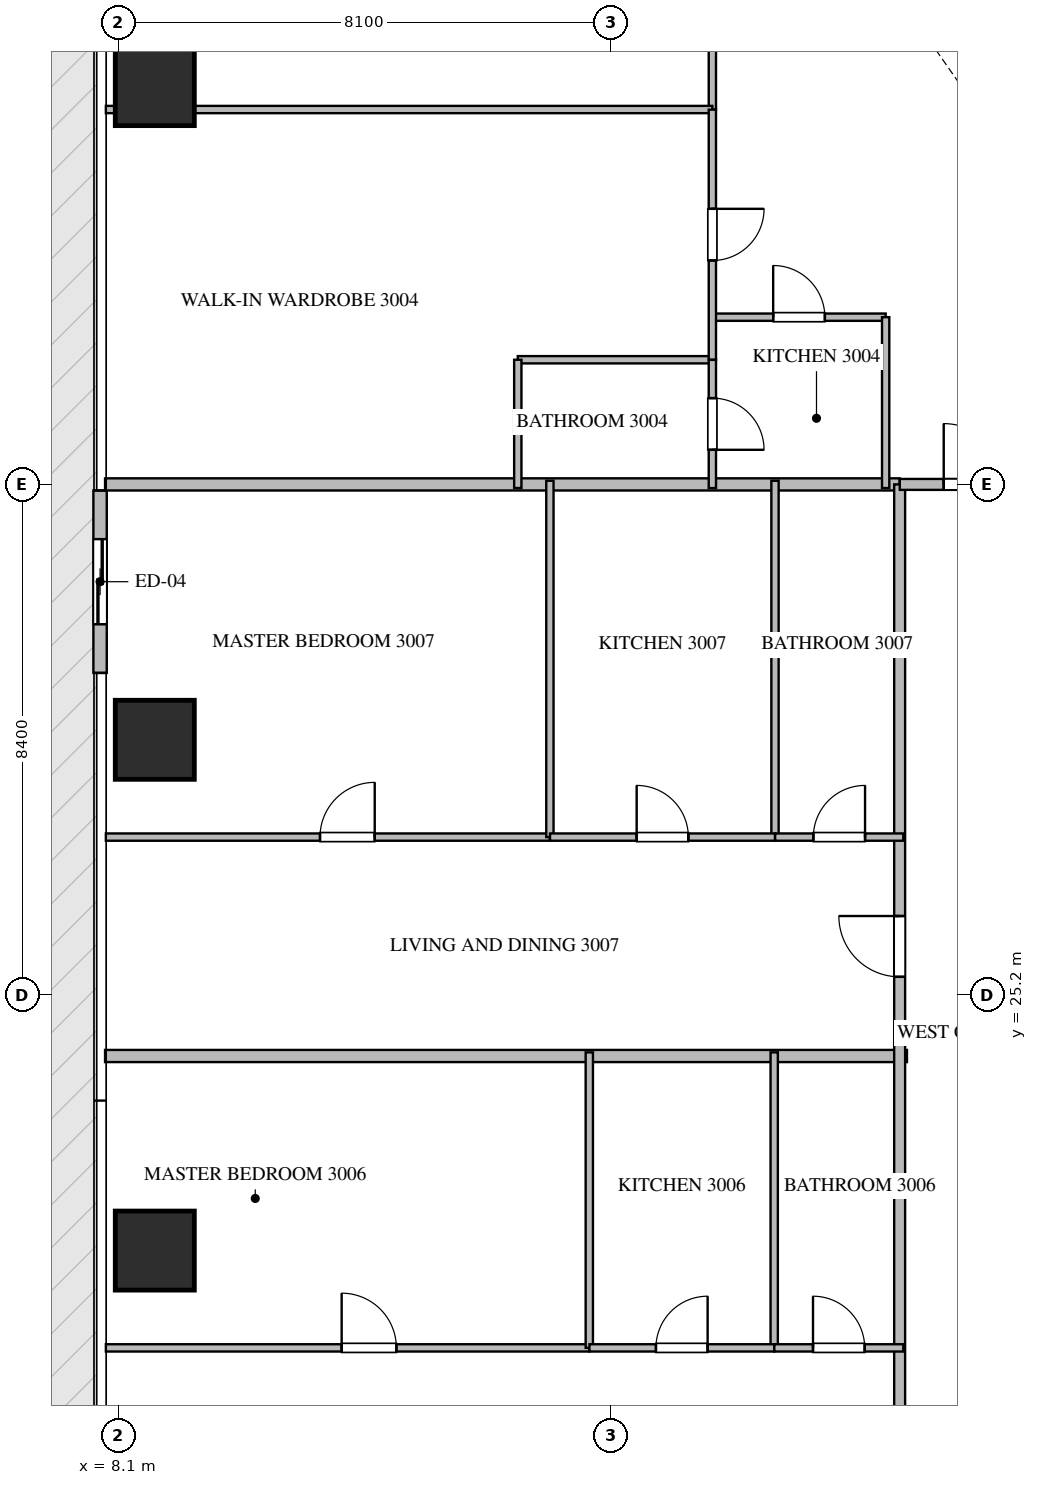
"""IFC4 building model, lengths in metres.
Left out: names, types, materials, properties, quantities, classifications, styles, units other than length and angle.
Written with IfcOpenShell. Run it as: python <this file> out.ifc"""

import sys

from ifc_helpers import new_model, si_unit, direction, frame, frame_2d, origin, origin_2d, place, context, subcontext, project, spatial, rectangle, extrude, source, transform, mapped, element, fill, save


model = new_model("IFC4")
c1 = context("Model", 3, precision=1e-05, world=origin(), true_north=direction((0.0, 1.0)))
c2 = subcontext(c1, "Body", "Model", "MODEL_VIEW")
j1 = project(units=[si_unit("LENGTHUNIT", "METRE"), si_unit("PLANEANGLEUNIT", "RADIAN")], contexts=[c1])
p1 = place(None, origin())
s1 = spatial("IfcSite", under=j1, at=p1, CompositionType="ELEMENT")
p2 = place(p1, origin())
s2 = spatial("IfcBuilding", under=s1, at=p2, CompositionType="ELEMENT")
p3 = place(p2, frame((0.0, 0.0, 123.9)))
s3 = spatial("IfcBuildingStorey", under=s2, at=p3, CompositionType="ELEMENT", Elevation=123.9)
m1 = source(origin(), c2, "Body", "SweptSolid", [
    extrude(rectangle(XDim=1.3, YDim=1.3, at=origin_2d()), origin(), (0.0, 0.0, 1.0), 3.75),
])
for number, where, z_axis, x_axis in (
    (1, (8.7, 21.0, -0.26), (0.0, 0.0, 1.0), (1.0, 0.0, 0.0)),
    (2, (8.7, 29.4, -0.26), (0.0, 0.0, 1.0), (1.0, 0.0, 0.0)),
    (3, (8.7, 40.15, -0.26), (0.0, 0.0, 1.0), (1.0, 0.0, 0.0)),
):
    element("IfcColumn", number, at=place(p3, frame(where, z_axis=z_axis, x_axis=x_axis)), inside=s3, PredefinedType="COLUMN", context=c2, shape_type="MappedRepresentation", body=[
        mapped(m1, transform((0.0, 0.0, 0.0), scale=1.0)),
    ])
p4 = place(p3, frame((7.8, 33.5, 0.0), z_axis=(0.0, 0.0, 1.0), x_axis=(0.0, -1.0, 0.0)))
e4 = element("IfcWall", 4, at=p4, inside=s3, PredefinedType="ELEMENTEDWALL", context=c2, shape_type="SweptSolid", body=[
    extrude(rectangle(XDim=3.0, YDim=0.22, at=frame_2d((1.5, 0.0))), origin(), (0.0, 0.0, 1.0), 3.475),
])
p5 = place(p4, frame((0.8, 0.0, 0.0)))
e5 = element("IfcOpeningElement", 5, at=p5, cuts=e4, PredefinedType="OPENING", context=c2, shape_type="SweptSolid", body=[
    extrude(rectangle(XDim=1.4, YDim=2.25, at=frame_2d((0.7, 1.125))), frame((0.0, 0.12, 0.0), z_axis=(0.0, -1.0, 0.0), x_axis=(1.0, 0.0, 0.0)), (0.0, 0.0, 1.0), 0.24),
])
p6 = place(p3, frame((7.882, 24.2, 0.0), z_axis=(0.0, 0.0, 1.0), x_axis=(1.0, 0.0, 0.0)))
e6 = element("IfcWall", 6, at=p6, inside=s3, PredefinedType="PARTITIONING", context=c2, shape_type="SweptSolid", body=[
    extrude(rectangle(XDim=13.188, YDim=0.2, at=frame_2d((6.594, 0.0))), origin(), (0.0, 0.0, 1.0), 3.49),
])
p7 = place(p3, frame((7.882, 33.6, 0.0), z_axis=(0.0, 0.0, 1.0), x_axis=(1.0, 0.0, 0.0)))
e7 = element("IfcWall", 7, at=p7, inside=s3, PredefinedType="PARTITIONING", context=c2, shape_type="SweptSolid", body=[
    extrude(rectangle(XDim=13.068, YDim=0.2, at=frame_2d((6.534, 0.0))), origin(), (0.0, 0.0, 1.0), 3.49),
])
p8 = place(p3, frame((20.95, 14.9, 0.0), z_axis=(0.0, 0.0, 1.0), x_axis=(0.0, 1.0, 0.0)))
e8 = element("IfcWall", 8, at=p8, inside=s3, PredefinedType="PARTITIONING", context=c2, shape_type="SweptSolid", body=[
    extrude(rectangle(XDim=18.7, YDim=0.18, at=frame_2d((9.35, 0.0))), origin(), (0.0, 0.0, 1.0), 3.49),
])
p9 = place(p8, frame((1.805, 0.0, 0.0)))
e9 = element("IfcOpeningElement", 9, at=p9, cuts=e8, PredefinedType="OPENING", context=c2, shape_type="SweptSolid", body=[
    extrude(rectangle(XDim=1.0, YDim=2.15, at=frame_2d((0.5, 1.075))), frame((0.0, 0.1, 0.0), z_axis=(0.0, -1.0, 0.0), x_axis=(1.0, 0.0, 0.0)), (0.0, 0.0, 1.0), 0.2),
])
p10 = place(p8, frame((10.602, 0.0, 0.0)))
e10 = element("IfcOpeningElement", 10, at=p10, cuts=e8, PredefinedType="OPENING", context=c2, shape_type="SweptSolid", body=[
    extrude(rectangle(XDim=1.0, YDim=2.15, at=frame_2d((0.5, 1.075))), frame((0.0, 0.1, 0.0), z_axis=(0.0, -1.0, 0.0), x_axis=(1.0, 0.0, 0.0)), (0.0, 0.0, 1.0), 0.2),
])
p11 = place(p3, frame((20.952, 33.6, 0.0), z_axis=(0.0, 0.0, 1.0), x_axis=(1.0, 0.0, 0.0)))
e11 = element("IfcWall", 11, at=p11, inside=s3, PredefinedType="PARTITIONING", context=c2, shape_type="SweptSolid", body=[
    extrude(rectangle(XDim=2.446, YDim=0.18, at=frame_2d((1.223, 0.0))), origin(), (0.0, 0.0, 1.0), 3.49),
])
p12 = place(p11, frame((0.723, 0.0, 0.0)))
e12 = element("IfcOpeningElement", 12, at=p12, cuts=e11, PredefinedType="OPENING", context=c2, shape_type="SweptSolid", body=[
    extrude(rectangle(XDim=1.0, YDim=2.15, at=frame_2d((0.5, 1.075))), frame((0.0, 0.1, 0.0), z_axis=(0.0, -1.0, 0.0), x_axis=(1.0, 0.0, 0.0)), (0.0, 0.0, 1.0), 0.2),
])
p13 = place(p3, frame((17.87, 36.35, 0.0), z_axis=(0.0, 0.0, 1.0), x_axis=(1.0, 0.0, 0.0)))
e13 = element("IfcWall", 13, at=p13, inside=s3, PredefinedType="PARTITIONING", context=c2, shape_type="SweptSolid", body=[
    extrude(rectangle(XDim=2.85, YDim=0.12, at=frame_2d((1.425, 0.0))), origin(), (0.0, 0.0, 1.0), 3.49),
])
p14 = place(p13, frame((1.0, 0.0, 0.0)))
e14 = element("IfcOpeningElement", 14, at=p14, cuts=e13, PredefinedType="OPENING", context=c2, shape_type="SweptSolid", body=[
    extrude(rectangle(XDim=0.85, YDim=2.1, at=frame_2d((0.425, 1.05))), frame((0.0, 0.07, 0.0), z_axis=(0.0, -1.0, 0.0), x_axis=(1.0, 0.0, 0.0)), (0.0, 0.0, 1.0), 0.14),
])
p15 = place(p3, frame((20.72, 36.35, 0.0), z_axis=(0.0, 0.0, 1.0), x_axis=(0.0, -1.0, 0.0)))
e15 = element("IfcWall", 15, at=p15, inside=s3, PredefinedType="PARTITIONING", context=c2, shape_type="SweptSolid", body=[
    extrude(rectangle(XDim=2.81, YDim=0.12, at=frame_2d((1.405, 0.0))), origin(), (0.0, 0.0, 1.0), 3.49),
])
p16 = place(p3, frame((17.87, 48.905, 0.0), z_axis=(0.0, 0.0, 1.0), x_axis=(0.0, -1.0, 0.0)))
e16 = element("IfcWall", 16, at=p16, inside=s3, PredefinedType="PARTITIONING", context=c2, shape_type="SweptSolid", body=[
    extrude(rectangle(XDim=9.14, YDim=0.12, at=frame_2d((4.57, 0.0))), origin(), (0.0, 0.0, 1.0), 3.49),
])
p17 = place(p16, frame((4.532, 0.0, 0.0)))
e17 = element("IfcOpeningElement", 17, at=p17, cuts=e16, PredefinedType="OPENING", context=c2, shape_type="SweptSolid", body=[
    extrude(rectangle(XDim=0.9, YDim=2.1, at=frame_2d((0.45, 1.05))), frame((0.0, 0.07, 0.0), z_axis=(0.0, -1.0, 0.0), x_axis=(1.0, 0.0, 0.0)), (0.0, 0.0, 1.0), 0.14),
])
p18 = place(p3, frame((7.895, 39.765, 0.0), z_axis=(0.0, 0.0, 1.0), x_axis=(1.0, 0.0, 0.0)))
e18 = element("IfcWall", 18, at=p18, inside=s3, PredefinedType="PARTITIONING", context=c2, shape_type="SweptSolid", body=[
    extrude(rectangle(XDim=9.975, YDim=0.12, at=frame_2d((4.988, 0.0))), origin(), (0.0, 0.0, 1.0), 3.49),
])
p19 = place(p3, frame((14.67, 35.65, 0.0), z_axis=(0.0, 0.0, 1.0), x_axis=(1.0, 0.0, 0.0)))
e19 = element("IfcWall", 19, at=p19, inside=s3, PredefinedType="PARTITIONING", context=c2, shape_type="SweptSolid", body=[
    extrude(rectangle(XDim=3.2, YDim=0.12, at=frame_2d((1.6, 0.0))), origin(), (0.0, 0.0, 1.0), 3.49),
])
p20 = place(p3, frame((14.67, 35.65, 0.0), z_axis=(0.0, 0.0, 1.0), x_axis=(0.0, -1.0, 0.0)))
e20 = element("IfcWall", 20, at=p20, inside=s3, PredefinedType="PARTITIONING", context=c2, shape_type="SweptSolid", body=[
    extrude(rectangle(XDim=2.11, YDim=0.12, at=frame_2d((1.055, 0.0))), origin(), (0.0, 0.0, 1.0), 3.49),
])
p21 = place(p3, frame((17.87, 39.763, 0.0), z_axis=(0.0, 0.0, 1.0), x_axis=(0.0, -1.0, 0.0)))
e21 = element("IfcWall", 21, at=p21, inside=s3, PredefinedType="PARTITIONING", context=c2, shape_type="SweptSolid", body=[
    extrude(rectangle(XDim=4.113, YDim=0.12, at=frame_2d((2.057, 0.0))), origin(), (0.0, 0.0, 1.0), 3.49),
])
p22 = place(p21, frame((1.631, 0.0, 0.0)))
e22 = element("IfcOpeningElement", 22, at=p22, cuts=e21, PredefinedType="OPENING", context=c2, shape_type="SweptSolid", body=[
    extrude(rectangle(XDim=0.85, YDim=2.1, at=frame_2d((0.425, 1.05))), frame((0.0, 0.07, 0.0), z_axis=(0.0, -1.0, 0.0), x_axis=(1.0, 0.0, 0.0)), (0.0, 0.0, 1.0), 0.14),
])
p23 = place(p3, frame((17.87, 35.648, 0.0), z_axis=(0.0, 0.0, 1.0), x_axis=(0.0, -1.0, 0.0)))
e23 = element("IfcWall", 23, at=p23, inside=s3, PredefinedType="PARTITIONING", context=c2, shape_type="SweptSolid", body=[
    extrude(rectangle(XDim=2.108, YDim=0.12, at=frame_2d((1.054, 0.0))), origin(), (0.0, 0.0, 1.0), 3.49),
])
p24 = place(p23, frame((0.629, 0.0, 0.0)))
e24 = element("IfcOpeningElement", 24, at=p24, cuts=e23, PredefinedType="OPENING", context=c2, shape_type="SweptSolid", body=[
    extrude(rectangle(XDim=0.85, YDim=2.1, at=frame_2d((0.425, 1.05))), frame((0.0, 0.07, 0.0), z_axis=(0.0, -1.0, 0.0), x_axis=(1.0, 0.0, 0.0)), (0.0, 0.0, 1.0), 0.14),
])
p25 = place(p3, frame((7.895, 19.4, 0.0), z_axis=(0.0, 0.0, 1.0), x_axis=(1.0, 0.0, 0.0)))
e25 = element("IfcWall", 25, at=p25, inside=s3, PredefinedType="PARTITIONING", context=c2, shape_type="SweptSolid", body=[
    extrude(rectangle(XDim=7.951, YDim=0.12, at=frame_2d((3.976, 0.0))), origin(), (0.0, 0.0, 1.0), 3.49),
])
p26 = place(p25, frame((3.878, 0.0, 0.0)))
e26 = element("IfcOpeningElement", 26, at=p26, cuts=e25, PredefinedType="OPENING", context=c2, shape_type="SweptSolid", body=[
    extrude(rectangle(XDim=0.9, YDim=2.1, at=frame_2d((0.45, 1.05))), frame((0.0, 0.07, 0.0), z_axis=(0.0, -1.0, 0.0), x_axis=(1.0, 0.0, 0.0)), (0.0, 0.0, 1.0), 0.14),
])
for number, where, z_axis, x_axis in (
    (27, (15.846, 19.4, 0.0), (0.0, 0.0, 1.0), (0.0, 1.0, 0.0)),
    (28, (18.887, 19.4, 0.0), (0.0, 0.0, 1.0), (0.0, 1.0, 0.0)),
):
    element("IfcWall", number, at=place(p3, frame(where, z_axis=z_axis, x_axis=x_axis)), inside=s3, PredefinedType="PARTITIONING", context=c2, shape_type="SweptSolid", body=[
        extrude(rectangle(XDim=4.86, YDim=0.12, at=frame_2d((2.43, 0.0))), origin(), (0.0, 0.0, 1.0), 3.49),
    ])
p27 = place(p3, frame((15.848, 19.4, 0.0), z_axis=(0.0, 0.0, 1.0), x_axis=(1.0, 0.0, 0.0)))
e29 = element("IfcWall", 29, at=p27, inside=s3, PredefinedType="PARTITIONING", context=c2, shape_type="SweptSolid", body=[
    extrude(rectangle(XDim=3.039, YDim=0.12, at=frame_2d((1.52, 0.0))), origin(), (0.0, 0.0, 1.0), 3.49),
])
p28 = place(p27, frame((1.094, 0.0, 0.0)))
e30 = element("IfcOpeningElement", 30, at=p28, cuts=e29, PredefinedType="OPENING", context=c2, shape_type="SweptSolid", body=[
    extrude(rectangle(XDim=0.85, YDim=2.1, at=frame_2d((0.425, 1.05))), frame((0.0, 0.07, 0.0), z_axis=(0.0, -1.0, 0.0), x_axis=(1.0, 0.0, 0.0)), (0.0, 0.0, 1.0), 0.14),
])
p29 = place(p3, frame((18.889, 19.4, 0.0), z_axis=(0.0, 0.0, 1.0), x_axis=(1.0, 0.0, 0.0)))
e31 = element("IfcWall", 31, at=p29, inside=s3, PredefinedType="PARTITIONING", context=c2, shape_type="SweptSolid", body=[
    extrude(rectangle(XDim=2.121, YDim=0.12, at=frame_2d((1.061, 0.0))), origin(), (0.0, 0.0, 1.0), 3.49),
])
p30 = place(p29, frame((0.636, 0.0, 0.0)))
e32 = element("IfcOpeningElement", 32, at=p30, cuts=e31, PredefinedType="OPENING", context=c2, shape_type="SweptSolid", body=[
    extrude(rectangle(XDim=0.85, YDim=2.1, at=frame_2d((0.425, 1.05))), frame((0.0, 0.07, 0.0), z_axis=(0.0, -1.0, 0.0), x_axis=(1.0, 0.0, 0.0)), (0.0, 0.0, 1.0), 0.14),
])
p31 = place(p3, frame((7.895, 27.8, 0.0), z_axis=(0.0, 0.0, 1.0), x_axis=(1.0, 0.0, 0.0)))
e33 = element("IfcWall", 33, at=p31, inside=s3, PredefinedType="PARTITIONING", context=c2, shape_type="SweptSolid", body=[
    extrude(rectangle(XDim=7.303, YDim=0.12, at=frame_2d((3.651, 0.0))), origin(), (0.0, 0.0, 1.0), 3.49),
])
p32 = place(p31, frame((3.522, 0.0, 0.0)))
e34 = element("IfcOpeningElement", 34, at=p32, cuts=e33, PredefinedType="OPENING", context=c2, shape_type="SweptSolid", body=[
    extrude(rectangle(XDim=0.9, YDim=2.1, at=frame_2d((0.45, 1.05))), frame((0.0, 0.07, 0.0), z_axis=(0.0, -1.0, 0.0), x_axis=(1.0, 0.0, 0.0)), (0.0, 0.0, 1.0), 0.14),
])
for number, where, z_axis, x_axis in (
    (35, (15.198, 27.8, 0.0), (0.0, 0.0, 1.0), (0.0, 1.0, 0.0)),
    (36, (18.9, 27.8, 0.0), (0.0, 0.0, 1.0), (0.0, 1.0, 0.0)),
):
    element("IfcWall", number, at=place(p3, frame(where, z_axis=z_axis, x_axis=x_axis)), inside=s3, PredefinedType="PARTITIONING", context=c2, shape_type="SweptSolid", body=[
        extrude(rectangle(XDim=5.86, YDim=0.12, at=frame_2d((2.93, 0.0))), origin(), (0.0, 0.0, 1.0), 3.49),
    ])
p33 = place(p3, frame((15.2, 27.8, 0.0), z_axis=(0.0, 0.0, 1.0), x_axis=(1.0, 0.0, 0.0)))
e37 = element("IfcWall", 37, at=p33, inside=s3, PredefinedType="PARTITIONING", context=c2, shape_type="SweptSolid", body=[
    extrude(rectangle(XDim=3.7, YDim=0.12, at=frame_2d((1.85, 0.0))), origin(), (0.0, 0.0, 1.0), 3.49),
])
p34 = place(p33, frame((1.425, 0.0, 0.0)))
e38 = element("IfcOpeningElement", 38, at=p34, cuts=e37, PredefinedType="OPENING", context=c2, shape_type="SweptSolid", body=[
    extrude(rectangle(XDim=0.85, YDim=2.1, at=frame_2d((0.425, 1.05))), frame((0.0, 0.07, 0.0), z_axis=(0.0, -1.0, 0.0), x_axis=(1.0, 0.0, 0.0)), (0.0, 0.0, 1.0), 0.14),
])
p35 = place(p3, frame((18.902, 27.8, 0.0), z_axis=(0.0, 0.0, 1.0), x_axis=(1.0, 0.0, 0.0)))
e39 = element("IfcWall", 39, at=p35, inside=s3, PredefinedType="PARTITIONING", context=c2, shape_type="SweptSolid", body=[
    extrude(rectangle(XDim=2.108, YDim=0.12, at=frame_2d((1.054, 0.0))), origin(), (0.0, 0.0, 1.0), 3.49),
])
p36 = place(p35, frame((0.629, 0.0, 0.0)))
e40 = element("IfcOpeningElement", 40, at=p36, cuts=e39, PredefinedType="OPENING", context=c2, shape_type="SweptSolid", body=[
    extrude(rectangle(XDim=0.85, YDim=2.1, at=frame_2d((0.425, 1.05))), frame((0.0, 0.07, 0.0), z_axis=(0.0, -1.0, 0.0), x_axis=(1.0, 0.0, 0.0)), (0.0, 0.0, 1.0), 0.14),
])
m2 = source(origin(), c2, "Body", "SweptSolid", [
    extrude(rectangle(XDim=1.4, YDim=2.25, at=frame_2d((0.7, 1.125))), frame((0.0, 0.025, 0.0), z_axis=(0.0, -1.0, 0.0), x_axis=(1.0, 0.0, 0.0)), (0.0, 0.0, 1.0), 0.05),
])
p37 = place(p5, origin())
e41 = element("IfcDoor", 41, at=p37, inside=s3, OperationType="SLIDING_TO_LEFT", PredefinedType="DOOR", context=c2, shape_type="MappedRepresentation", body=[
    mapped(m2, transform((0.0, 0.0, 0.0), scale=1.0)),
])
fill(e5, e41)
m3 = source(origin(), c2, "Body", "SweptSolid", [
    extrude(rectangle(XDim=1.0, YDim=2.15, at=frame_2d((0.5, 1.075))), frame((0.0, 0.025, 0.0), z_axis=(0.0, -1.0, 0.0), x_axis=(1.0, 0.0, 0.0)), (0.0, 0.0, 1.0), 0.05),
])
p38 = place(p10, origin())
e42 = element("IfcDoor", 42, at=p38, inside=s3, OperationType="SINGLE_SWING_RIGHT", PredefinedType="DOOR", context=c2, shape_type="MappedRepresentation", body=[
    mapped(m3, transform((0.0, 0.0, 0.0), scale=1.0)),
])
fill(e10, e42)
p39 = place(p12, origin())
e43 = element("IfcDoor", 43, at=p39, inside=s3, OperationType="SINGLE_SWING_LEFT", PredefinedType="DOOR", context=c2, shape_type="MappedRepresentation", body=[
    mapped(m3, transform((0.0, 0.0, 0.0), scale=1.0)),
])
fill(e12, e43)
m4 = source(origin(), c2, "Body", "SweptSolid", [
    extrude(rectangle(XDim=0.85, YDim=2.1, at=frame_2d((0.425, 1.05))), frame((0.0, 0.025, 0.0), z_axis=(0.0, -1.0, 0.0), x_axis=(1.0, 0.0, 0.0)), (0.0, 0.0, 1.0), 0.05),
])
p40 = place(p14, origin())
e44 = element("IfcDoor", 44, at=p40, inside=s3, OperationType="SINGLE_SWING_LEFT", PredefinedType="DOOR", context=c2, shape_type="MappedRepresentation", body=[
    mapped(m4, transform((0.0, 0.0, 0.0), scale=1.0)),
])
fill(e14, e44)
p41 = place(p22, origin())
e45 = element("IfcDoor", 45, at=p41, inside=s3, OperationType="SINGLE_SWING_LEFT", PredefinedType="DOOR", context=c2, shape_type="MappedRepresentation", body=[
    mapped(m4, transform((0.0, 0.0, 0.0), scale=1.0)),
])
fill(e22, e45)
p42 = place(p24, origin())
e46 = element("IfcDoor", 46, at=p42, inside=s3, OperationType="SINGLE_SWING_RIGHT", PredefinedType="DOOR", context=c2, shape_type="MappedRepresentation", body=[
    mapped(m4, transform((0.0, 0.0, 0.0), scale=1.0)),
])
fill(e24, e46)
m5 = source(origin(), c2, "Body", "SweptSolid", [
    extrude(rectangle(XDim=0.9, YDim=2.1, at=frame_2d((0.45, 1.05))), frame((0.0, 0.025, 0.0), z_axis=(0.0, -1.0, 0.0), x_axis=(1.0, 0.0, 0.0)), (0.0, 0.0, 1.0), 0.05),
])
p43 = place(p26, origin())
e47 = element("IfcDoor", 47, at=p43, inside=s3, OperationType="SINGLE_SWING_LEFT", PredefinedType="DOOR", context=c2, shape_type="MappedRepresentation", body=[
    mapped(m5, transform((0.0, 0.0, 0.0), scale=1.0)),
])
fill(e26, e47)
p44 = place(p28, origin())
e48 = element("IfcDoor", 48, at=p44, inside=s3, OperationType="SINGLE_SWING_RIGHT", PredefinedType="DOOR", context=c2, shape_type="MappedRepresentation", body=[
    mapped(m4, transform((0.0, 0.0, 0.0), scale=1.0)),
])
fill(e30, e48)
p45 = place(p30, origin())
e49 = element("IfcDoor", 49, at=p45, inside=s3, OperationType="SINGLE_SWING_LEFT", PredefinedType="DOOR", context=c2, shape_type="MappedRepresentation", body=[
    mapped(m4, transform((0.0, 0.0, 0.0), scale=1.0)),
])
fill(e32, e49)
p46 = place(p32, origin())
e50 = element("IfcDoor", 50, at=p46, inside=s3, OperationType="SINGLE_SWING_RIGHT", PredefinedType="DOOR", context=c2, shape_type="MappedRepresentation", body=[
    mapped(m5, transform((0.0, 0.0, 0.0), scale=1.0)),
])
fill(e34, e50)
p47 = place(p34, origin())
e51 = element("IfcDoor", 51, at=p47, inside=s3, OperationType="SINGLE_SWING_LEFT", PredefinedType="DOOR", context=c2, shape_type="MappedRepresentation", body=[
    mapped(m4, transform((0.0, 0.0, 0.0), scale=1.0)),
])
fill(e38, e51)
p48 = place(p36, origin())
e52 = element("IfcDoor", 52, at=p48, inside=s3, OperationType="SINGLE_SWING_RIGHT", PredefinedType="DOOR", context=c2, shape_type="MappedRepresentation", body=[
    mapped(m4, transform((0.0, 0.0, 0.0), scale=1.0)),
])
fill(e40, e52)
save(model, sys.argv[1])
